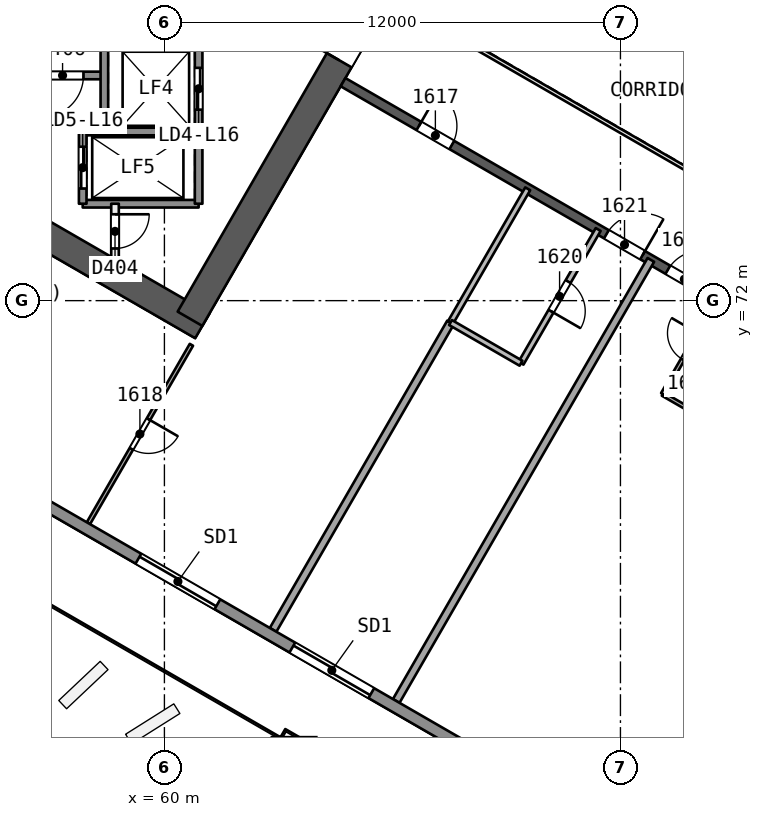
"""IFC4 building model, lengths in metres.
Left out: names, types, materials, properties, quantities, classifications, styles, units other than length and angle.
Written with IfcOpenShell. Run it as: python <this file> out.ifc"""

import sys

from ifc_helpers import new_model, si_unit, direction, frame, frame_2d, origin, origin_2d, place, context, subcontext, project, spatial, rectangle, extrude, element, fill, save


model = new_model("IFC4")
c1 = context("Model", 3, precision=1e-05, world=origin(), true_north=direction((0.0, 1.0)))
c2 = subcontext(c1, "Body", "Model", "MODEL_VIEW")
j1 = project(units=[si_unit("LENGTHUNIT", "METRE"), si_unit("PLANEANGLEUNIT", "RADIAN")], contexts=[c1])
p1 = place(None, origin())
s1 = spatial("IfcSite", under=j1, at=p1, CompositionType="ELEMENT")
p2 = place(p1, origin())
s2 = spatial("IfcBuilding", under=s1, at=p2, CompositionType="ELEMENT")
p3 = place(p2, frame((0.0, 0.0, 72.1)))
s3 = spatial("IfcBuildingStorey", under=s2, at=p3, CompositionType="ELEMENT", Elevation=72.1)
p4 = place(p3, frame((48.772, 78.394, 0.0), z_axis=(0.0, 0.0, 1.0), x_axis=(0.866028339916, -0.499994914436, 0.0)))
e1 = element("IfcWall", 1, at=p4, inside=s3, PredefinedType="SHEAR", context=c2, shape_type="SweptSolid", body=[
    extrude(rectangle(XDim=14.117, YDim=0.75, at=frame_2d((7.059, 0.0))), origin(), (0.0, 0.0, 1.0), 3.7),
])
p5 = place(p3, frame((60.673, 71.523, 0.0), z_axis=(0.0, 0.0, 1.0), x_axis=(0.499997052475, 0.866027105532, 0.0)))
e2 = element("IfcWall", 2, at=p5, inside=s3, PredefinedType="SHEAR", context=c2, shape_type="SweptSolid", body=[
    extrude(rectangle(XDim=10.005, YDim=0.75, at=frame_2d((5.002, 0.0))), origin(), (0.0, 0.0, 1.0), 3.7),
])
p6 = place(p5, frame((7.855, 0.0, 0.0)))
e3 = element("IfcOpeningElement", 3, at=p6, cuts=e2, PredefinedType="OPENING", context=c2, shape_type="SweptSolid", body=[
    extrude(rectangle(XDim=1.2, YDim=2.1, at=frame_2d((0.6, 1.05))), frame((0.0, 0.385, 0.0), z_axis=(0.0, -1.0, 0.0), x_axis=(1.0, 0.0, 0.0)), (0.0, 0.0, 1.0), 0.771),
])
p7 = place(p3, frame((64.7, 77.748, 0.0), z_axis=(0.0, 0.0, 1.0), x_axis=(0.866026492143, -0.499998114903, 0.0)))
e4 = element("IfcWall", 4, at=p7, inside=s3, PredefinedType="SHEAR", context=c2, shape_type="SweptSolid", body=[
    extrude(rectangle(XDim=15.588, YDim=0.25, at=frame_2d((7.794, 0.0))), origin(), (0.0, 0.0, 1.0), 3.2),
])
p8 = place(p7, frame((2.306, 0.0, 0.0)))
e5 = element("IfcOpeningElement", 5, at=p8, cuts=e4, PredefinedType="OPENING", context=c2, shape_type="SweptSolid", body=[
    extrude(rectangle(XDim=1.0, YDim=2.1, at=frame_2d((0.5, 1.05))), frame((0.0, 0.135, 0.0), z_axis=(0.0, -1.0, 0.0), x_axis=(1.0, 0.0, 0.0)), (0.0, 0.0, 1.0), 0.271),
])
p9 = place(p7, frame((8.003, 0.0, 0.0)))
e6 = element("IfcOpeningElement", 6, at=p9, cuts=e4, PredefinedType="OPENING", context=c2, shape_type="SweptSolid", body=[
    extrude(rectangle(XDim=1.1, YDim=2.1, at=frame_2d((0.55, 1.05))), frame((0.0, 0.135, 0.0), z_axis=(0.0, -1.0, 0.0), x_axis=(1.0, 0.0, 0.0)), (0.0, 0.0, 1.0), 0.271),
])
p10 = place(p7, frame((9.871, 0.0, 0.0)))
e7 = element("IfcOpeningElement", 7, at=p10, cuts=e4, PredefinedType="OPENING", context=c2, shape_type="SweptSolid", body=[
    extrude(rectangle(XDim=1.0, YDim=2.1, at=frame_2d((0.5, 1.05))), frame((0.0, 0.135, 0.0), z_axis=(0.0, -1.0, 0.0), x_axis=(1.0, 0.0, 0.0)), (0.0, 0.0, 1.0), 0.271),
])
p11 = place(p3, frame((63.4, 59.908, 0.0), z_axis=(0.010093620709, 0.017482414954, 0.999796221231), x_axis=(-0.866022643586, 0.500004780773, 1.3036e-08)))
e8 = element("IfcColumn", 8, at=p11, inside=s3, PredefinedType="COLUMN", context=c2, shape_type="SweptSolid", body=[
    extrude(rectangle(XDim=1.1, YDim=1.1, at=origin_2d()), origin(), (0.0, 0.0, 1.0), 3.701),
])
p12 = place(p3, frame((60.71, 70.838, 0.0), z_axis=(0.0, 0.0, 1.0), x_axis=(-0.499974500895, -0.866040125199, 0.0)))
e9 = element("IfcWall", 9, at=p12, inside=s3, PredefinedType="PARTITIONING", context=c2, shape_type="SweptSolid", body=[
    extrude(rectangle(XDim=5.422, YDim=0.1, at=frame_2d((2.711, 0.0))), origin(), (0.0, 0.0, 1.0), 3.2),
])
p13 = place(p12, frame((2.261, 0.0, 0.0)))
e10 = element("IfcOpeningElement", 10, at=p13, cuts=e9, PredefinedType="OPENING", context=c2, shape_type="SweptSolid", body=[
    extrude(rectangle(XDim=0.9, YDim=2.1, at=frame_2d((0.45, 1.05))), frame((0.0, 0.061, 0.0), z_axis=(0.0, -1.0, 0.0), x_axis=(1.0, 0.0, 0.0)), (0.0, 0.0, 1.0), 0.121),
])
p14 = place(p3, frame((62.859, 63.337, 0.0), z_axis=(0.0, 0.0, 1.0), x_axis=(0.500016660921, 0.866015784384, 0.0)))
e11 = element("IfcWall", 11, at=p14, inside=s3, PredefinedType="PARTITIONING", context=c2, shape_type="SweptSolid", body=[
    extrude(rectangle(XDim=9.338, YDim=0.2, at=frame_2d((4.669, 0.0))), origin(), (0.0, 0.0, 1.0), 3.2),
])
p15 = place(p3, frame((67.529, 71.424, 0.0), z_axis=(0.0, 0.0, 1.0), x_axis=(0.499984252764, 0.866034495264, 0.0)))
e12 = element("IfcWall", 12, at=p15, inside=s3, PredefinedType="PARTITIONING", context=c2, shape_type="SweptSolid", body=[
    extrude(rectangle(XDim=4.063, YDim=0.15, at=frame_2d((2.032, 0.0))), origin(), (0.0, 0.0, 1.0), 3.2),
])
p16 = place(p3, frame((71.414, 73.872, 0.0), z_axis=(0.0, 0.0, 1.0), x_axis=(-0.499984252764, -0.866034495264, 0.0)))
e13 = element("IfcWall", 13, at=p16, inside=s3, PredefinedType="PARTITIONING", context=c2, shape_type="SweptSolid", body=[
    extrude(rectangle(XDim=4.063, YDim=0.15, at=frame_2d((2.032, 0.0))), origin(), (0.0, 0.0, 1.0), 3.2),
])
p17 = place(p16, frame((1.582, 0.0, 0.0)))
e14 = element("IfcOpeningElement", 14, at=p17, cuts=e13, PredefinedType="OPENING", context=c2, shape_type="SweptSolid", body=[
    extrude(rectangle(XDim=0.9, YDim=2.1, at=frame_2d((0.45, 1.05))), frame((0.0, 0.085, 0.0), z_axis=(0.0, -1.0, 0.0), x_axis=(1.0, 0.0, 0.0)), (0.0, 0.0, 1.0), 0.171),
])
p18 = place(p3, frame((69.383, 70.353, 0.0), z_axis=(0.0, 0.0, 1.0), x_axis=(-0.866024183959, 0.500002112793, 0.0)))
e15 = element("IfcWall", 15, at=p18, inside=s3, PredefinedType="PARTITIONING", context=c2, shape_type="SweptSolid", body=[
    extrude(rectangle(XDim=2.141, YDim=0.15, at=frame_2d((1.071, 0.0))), origin(), (0.0, 0.0, 1.0), 3.2),
])
p19 = place(p3, frame((66.099, 61.466, 0.0), z_axis=(0.0, 0.0, 1.0), x_axis=(0.500006835139, 0.866021457479, 0.0)))
e16 = element("IfcWall", 16, at=p19, inside=s3, PredefinedType="PARTITIONING", context=c2, shape_type="SweptSolid", body=[
    extrude(rectangle(XDim=13.401, YDim=0.2, at=frame_2d((6.701, 0.0))), origin(), (0.0, 0.0, 1.0), 3.2),
])
p20 = place(p3, frame((74.498, 68.743, 0.0), z_axis=(0.0, 0.0, 1.0), x_axis=(-0.865989903783, 0.500061482766, 0.0)))
e17 = element("IfcWall", 17, at=p20, inside=s3, PredefinedType="PARTITIONING", context=c2, shape_type="SweptSolid", body=[
    extrude(rectangle(XDim=1.6, YDim=0.1, at=frame_2d((0.8, 0.0))), origin(), (0.0, 0.0, 1.0), 3.2),
])
p21 = place(p3, frame((73.113, 69.543, 0.0), z_axis=(0.0, 0.0, 1.0), x_axis=(0.499987231761, 0.866032775405, 0.0)))
e18 = element("IfcWall", 18, at=p21, inside=s3, PredefinedType="PARTITIONING", context=c2, shape_type="SweptSolid", body=[
    extrude(rectangle(XDim=2.9, YDim=0.1, at=frame_2d((1.45, 0.0))), origin(), (0.0, 0.0, 1.0), 3.2),
])
p22 = place(p21, frame((1.05, 0.0, 0.0)))
e19 = element("IfcOpeningElement", 19, at=p22, cuts=e18, PredefinedType="OPENING", context=c2, shape_type="SweptSolid", body=[
    extrude(rectangle(XDim=0.8, YDim=2.1, at=frame_2d((0.4, 1.05))), frame((0.0, 0.061, 0.0), z_axis=(0.0, -1.0, 0.0), x_axis=(1.0, 0.0, 0.0)), (0.0, 0.0, 1.0), 0.121),
])
p23 = place(p3, frame((90.388, 47.271, 0.0), z_axis=(0.0, 0.0, 1.0), x_axis=(-0.866024483997, 0.500001593116, 0.0)))
e20 = element("IfcWall", 20, at=p23, inside=s3, PredefinedType="SOLIDWALL", context=c2, shape_type="SweptSolid", body=[
    extrude(rectangle(XDim=59.381, YDim=0.3, at=frame_2d((29.69, 0.0))), origin(), (0.0, 0.0, 1.0), 3.2),
])
p24 = place(p23, frame((28.802, 0.0, 0.0)))
e21 = element("IfcOpeningElement", 21, at=p24, cuts=e20, PredefinedType="OPENING", context=c2, shape_type="SweptSolid", body=[
    extrude(rectangle(XDim=2.4, YDim=2.4, at=frame_2d((1.2, 1.2))), frame((0.0, 0.161, 0.0), z_axis=(0.0, -1.0, 0.0), x_axis=(1.0, 0.0, 0.0)), (0.0, 0.0, 1.0), 0.321),
])
p25 = place(p23, frame((33.479, 0.0, 0.0)))
e22 = element("IfcOpeningElement", 22, at=p25, cuts=e20, PredefinedType="OPENING", context=c2, shape_type="SweptSolid", body=[
    extrude(rectangle(XDim=2.4, YDim=2.4, at=frame_2d((1.2, 1.2))), frame((0.0, 0.161, 0.0), z_axis=(0.0, -1.0, 0.0), x_axis=(1.0, 0.0, 0.0)), (0.0, 0.0, 1.0), 0.321),
])
p26 = place(p23, frame((46.066, 0.0, 0.0)))
e23 = element("IfcOpeningElement", 23, at=p26, cuts=e20, PredefinedType="OPENING", context=c2, shape_type="SweptSolid", body=[
    extrude(rectangle(XDim=2.4, YDim=2.4, at=frame_2d((1.2, 1.2))), frame((0.0, 0.161, 0.0), z_axis=(0.0, -1.0, 0.0), x_axis=(1.0, 0.0, 0.0)), (0.0, 0.0, 1.0), 0.321),
])
p27 = place(p23, frame((12.823, 0.0, 0.0)))
e24 = element("IfcOpeningElement", 24, at=p27, cuts=e20, PredefinedType="OPENING", context=c2, shape_type="SweptSolid", body=[
    extrude(rectangle(XDim=2.4, YDim=2.4, at=frame_2d((1.2, 1.2))), frame((0.0, 0.161, 0.0), z_axis=(0.0, -1.0, 0.0), x_axis=(1.0, 0.0, 0.0)), (0.0, 0.0, 1.0), 0.321),
])
p28 = place(p3, frame((58.42, 77.925, 0.0), z_axis=(0.0, 0.0, 1.0), x_axis=(-1.0, 0.0, 0.0)))
e25 = element("IfcWall", 25, at=p28, inside=s3, PredefinedType="SOLIDWALL", context=c2, shape_type="SweptSolid", body=[
    extrude(rectangle(XDim=7.7, YDim=0.2, at=frame_2d((3.85, 0.0))), origin(), (0.0, 0.0, 1.0), 3.2),
])
p29 = place(p28, frame((0.55, 0.0, 0.0)))
e26 = element("IfcOpeningElement", 26, at=p29, cuts=e25, PredefinedType="OPENING", context=c2, shape_type="SweptSolid", body=[
    extrude(rectangle(XDim=1.1, YDim=2.1, at=frame_2d((0.55, 1.05))), frame((0.0, 0.11, 0.0), z_axis=(0.0, -1.0, 0.0), x_axis=(1.0, 0.0, 0.0)), (0.0, 0.0, 1.0), 0.221),
])
for number, where, z_axis, x_axis in (
    (27, (60.9, 76.45, 0.0), (0.0, 0.0, 1.0), (-1.0, 0.0, 0.0)),
    (28, (60.9, 74.55, 0.0), (0.0, 0.0, 1.0), (-1.0, 0.0, 0.0)),
):
    element("IfcWall", number, at=place(p3, frame(where, z_axis=z_axis, x_axis=x_axis)), inside=s3, PredefinedType="SOLIDWALL", context=c2, shape_type="SweptSolid", body=[
        extrude(rectangle(XDim=3.05, YDim=0.2, at=frame_2d((1.525, 0.0))), origin(), (0.0, 0.0, 1.0), 3.2),
    ])
p30 = place(p3, frame((60.9, 85.45, 0.0), z_axis=(0.0, 0.0, 1.0), x_axis=(0.0, -1.0, 0.0)))
e29 = element("IfcWall", 29, at=p30, inside=s3, PredefinedType="SOLIDWALL", context=c2, shape_type="SweptSolid", body=[
    extrude(rectangle(XDim=10.9, YDim=0.2, at=frame_2d((5.45, 0.0))), origin(), (0.0, 0.0, 1.0), 3.2),
])
p31 = place(p30, frame((0.575, 0.0, 0.0)))
e30 = element("IfcOpeningElement", 30, at=p31, cuts=e29, PredefinedType="OPENING", context=c2, shape_type="SweptSolid", body=[
    extrude(rectangle(XDim=1.1, YDim=2.1, at=frame_2d((0.55, 1.05))), frame((0.0, 0.11, 0.0), z_axis=(0.0, -1.0, 0.0), x_axis=(1.0, 0.0, 0.0)), (0.0, 0.0, 1.0), 0.221),
])
p32 = place(p30, frame((2.825, 0.0, 0.0)))
e31 = element("IfcOpeningElement", 31, at=p32, cuts=e29, PredefinedType="OPENING", context=c2, shape_type="SweptSolid", body=[
    extrude(rectangle(XDim=1.1, YDim=2.1, at=frame_2d((0.55, 1.05))), frame((0.0, 0.11, 0.0), z_axis=(0.0, -1.0, 0.0), x_axis=(1.0, 0.0, 0.0)), (0.0, 0.0, 1.0), 0.221),
])
p33 = place(p30, frame((5.075, 0.0, 0.0)))
e32 = element("IfcOpeningElement", 32, at=p33, cuts=e29, PredefinedType="OPENING", context=c2, shape_type="SweptSolid", body=[
    extrude(rectangle(XDim=1.1, YDim=2.1, at=frame_2d((0.55, 1.05))), frame((0.0, 0.11, 0.0), z_axis=(0.0, -1.0, 0.0), x_axis=(1.0, 0.0, 0.0)), (0.0, 0.0, 1.0), 0.221),
])
p34 = place(p30, frame((7.325, 0.0, 0.0)))
e33 = element("IfcOpeningElement", 33, at=p34, cuts=e29, PredefinedType="OPENING", context=c2, shape_type="SweptSolid", body=[
    extrude(rectangle(XDim=1.1, YDim=2.1, at=frame_2d((0.55, 1.05))), frame((0.0, 0.11, 0.0), z_axis=(0.0, -1.0, 0.0), x_axis=(1.0, 0.0, 0.0)), (0.0, 0.0, 1.0), 0.221),
])
p35 = place(p3, frame((58.7, 74.55, 0.0), z_axis=(0.0, 0.0, 1.0), x_axis=(0.0, -1.0, 0.0)))
e34 = element("IfcWall", 34, at=p35, inside=s3, PredefinedType="PARTITIONING", context=c2, shape_type="SweptSolid", body=[
    extrude(rectangle(XDim=1.455, YDim=0.2, at=frame_2d((0.728, 0.0))), origin(), (0.0, 0.0, 1.0), 3.2),
])
p36 = place(p35, frame((0.278, 0.0, 0.0)))
e35 = element("IfcOpeningElement", 35, at=p36, cuts=e34, PredefinedType="OPENING", context=c2, shape_type="SweptSolid", body=[
    extrude(rectangle(XDim=0.9, YDim=2.1, at=frame_2d((0.45, 1.05))), frame((0.0, 0.11, 0.0), z_axis=(0.0, -1.0, 0.0), x_axis=(1.0, 0.0, 0.0)), (0.0, 0.0, 1.0), 0.221),
])
p37 = place(p3, frame((58.42, 85.45, 0.0), z_axis=(0.0, 0.0, 1.0), x_axis=(0.0, -1.0, 0.0)))
e36 = element("IfcWall", 36, at=p37, inside=s3, PredefinedType="SOLIDWALL", context=c2, shape_type="SweptSolid", body=[
    extrude(rectangle(XDim=9.0, YDim=0.2, at=frame_2d((4.5, 0.0))), origin(), (0.0, 0.0, 1.0), 3.2),
])
p38 = place(p3, frame((57.85, 76.45, 0.0), z_axis=(0.0, 0.0, 1.0), x_axis=(0.0, -1.0, 0.0)))
e37 = element("IfcWall", 37, at=p38, inside=s3, PredefinedType="SOLIDWALL", context=c2, shape_type="SweptSolid", body=[
    extrude(rectangle(XDim=1.9, YDim=0.2, at=frame_2d((0.95, 0.0))), origin(), (0.0, 0.0, 1.0), 3.2),
])
p39 = place(p38, frame((0.4, 0.0, 0.0)))
e38 = element("IfcOpeningElement", 38, at=p39, cuts=e37, PredefinedType="OPENING", context=c2, shape_type="SweptSolid", body=[
    extrude(rectangle(XDim=1.1, YDim=2.1, at=frame_2d((0.55, 1.05))), frame((0.0, 0.11, 0.0), z_axis=(0.0, -1.0, 0.0), x_axis=(1.0, 0.0, 0.0)), (0.0, 0.0, 1.0), 0.221),
])
p40 = place(p3, frame((67.702, 78.948, 0.0), z_axis=(0.0, 0.0, 1.0), x_axis=(0.866026658274, -0.499997827154, 0.0)))
e39 = element("IfcWall", 39, at=p40, inside=s3, PredefinedType="PARTITIONING", context=c2, shape_type="SweptSolid", body=[
    extrude(rectangle(XDim=11.588, YDim=0.1, at=frame_2d((5.794, 0.0))), origin(), (0.0, 0.0, 1.0), 3.2),
])
p41 = place(p8, origin())
e40 = element("IfcDoor", 40, at=p41, inside=s3, OperationType="SINGLE_SWING_LEFT", PredefinedType="NOTDEFINED", context=c2, shape_type="SweptSolid", body=[
    extrude(rectangle(XDim=1.0, YDim=2.1, at=frame_2d((0.5, 1.05))), frame((0.0, 0.025, 0.0), z_axis=(0.0, -1.0, 0.0), x_axis=(1.0, 0.0, 0.0)), (0.0, 0.0, 1.0), 0.05),
])
fill(e5, e40)
p42 = place(p13, origin())
e41 = element("IfcDoor", 41, at=p42, inside=s3, OperationType="SINGLE_SWING_LEFT", PredefinedType="NOTDEFINED", context=c2, shape_type="SweptSolid", body=[
    extrude(rectangle(XDim=0.9, YDim=2.1, at=frame_2d((0.45, 1.05))), frame((0.0, 0.025, 0.0), z_axis=(0.0, -1.0, 0.0), x_axis=(1.0, 0.0, 0.0)), (0.0, 0.0, 1.0), 0.05),
])
fill(e10, e41)
p43 = place(p17, origin())
e42 = element("IfcDoor", 42, at=p43, inside=s3, OperationType="SINGLE_SWING_RIGHT", PredefinedType="NOTDEFINED", context=c2, shape_type="SweptSolid", body=[
    extrude(rectangle(XDim=0.9, YDim=2.1, at=frame_2d((0.45, 1.05))), frame((0.0, 0.025, 0.0), z_axis=(0.0, -1.0, 0.0), x_axis=(1.0, 0.0, 0.0)), (0.0, 0.0, 1.0), 0.05),
])
fill(e14, e42)
p44 = place(p9, origin())
e43 = element("IfcDoor", 43, at=p44, inside=s3, OperationType="SINGLE_SWING_RIGHT", PredefinedType="NOTDEFINED", context=c2, shape_type="SweptSolid", body=[
    extrude(rectangle(XDim=1.1, YDim=2.1, at=frame_2d((0.55, 1.05))), frame((0.0, 0.025, 0.0), z_axis=(0.0, -1.0, 0.0), x_axis=(1.0, 0.0, 0.0)), (0.0, 0.0, 1.0), 0.05),
])
fill(e6, e43)
p45 = place(p22, origin())
e44 = element("IfcDoor", 44, at=p45, inside=s3, OperationType="SINGLE_SWING_RIGHT", PredefinedType="NOTDEFINED", context=c2, shape_type="SweptSolid", body=[
    extrude(rectangle(XDim=0.8, YDim=2.1, at=frame_2d((0.4, 1.05))), frame((0.0, 0.025, 0.0), z_axis=(0.0, -1.0, 0.0), x_axis=(1.0, 0.0, 0.0)), (0.0, 0.0, 1.0), 0.05),
])
fill(e19, e44)
p46 = place(p10, origin())
e45 = element("IfcDoor", 45, at=p46, inside=s3, OperationType="SINGLE_SWING_RIGHT", PredefinedType="NOTDEFINED", context=c2, shape_type="SweptSolid", body=[
    extrude(rectangle(XDim=1.0, YDim=2.1, at=frame_2d((0.5, 1.05))), frame((0.0, 0.025, 0.0), z_axis=(0.0, -1.0, 0.0), x_axis=(1.0, 0.0, 0.0)), (0.0, 0.0, 1.0), 0.05),
])
fill(e7, e45)
p47 = place(p24, origin())
e46 = element("IfcDoor", 46, at=p47, inside=s3, OperationType="SLIDING_TO_LEFT", PredefinedType="NOTDEFINED", context=c2, shape_type="SweptSolid", body=[
    extrude(rectangle(XDim=2.4, YDim=2.4, at=frame_2d((1.2, 1.2))), frame((0.0, 0.025, 0.0), z_axis=(0.0, -1.0, 0.0), x_axis=(1.0, 0.0, 0.0)), (0.0, 0.0, 1.0), 0.05),
])
fill(e21, e46)
p48 = place(p25, origin())
e47 = element("IfcDoor", 47, at=p48, inside=s3, OperationType="SLIDING_TO_RIGHT", PredefinedType="NOTDEFINED", context=c2, shape_type="SweptSolid", body=[
    extrude(rectangle(XDim=2.4, YDim=2.4, at=frame_2d((1.2, 1.2))), frame((0.0, 0.025, 0.0), z_axis=(0.0, -1.0, 0.0), x_axis=(1.0, 0.0, 0.0)), (0.0, 0.0, 1.0), 0.05),
])
fill(e22, e47)
p49 = place(p6, origin())
e48 = element("IfcDoor", 48, at=p49, inside=s3, OperationType="SINGLE_SWING_LEFT", PredefinedType="NOTDEFINED", context=c2, shape_type="SweptSolid", body=[
    extrude(rectangle(XDim=1.2, YDim=2.1, at=frame_2d((0.6, 1.05))), frame((0.0, 0.025, 0.0), z_axis=(0.0, -1.0, 0.0), x_axis=(1.0, 0.0, 0.0)), (0.0, 0.0, 1.0), 0.05),
])
fill(e3, e48)
p50 = place(p34, origin())
e49 = element("IfcDoor", 49, at=p50, inside=s3, OperationType="SLIDING_TO_LEFT", PredefinedType="NOTDEFINED", context=c2, shape_type="SweptSolid", body=[
    extrude(rectangle(XDim=1.1, YDim=2.1, at=frame_2d((0.55, 1.05))), frame((0.0, 0.025, 0.0), z_axis=(0.0, -1.0, 0.0), x_axis=(1.0, 0.0, 0.0)), (0.0, 0.0, 1.0), 0.05),
])
fill(e33, e49)
p51 = place(p39, origin())
e50 = element("IfcDoor", 50, at=p51, inside=s3, OperationType="SLIDING_TO_RIGHT", PredefinedType="NOTDEFINED", context=c2, shape_type="SweptSolid", body=[
    extrude(rectangle(XDim=1.1, YDim=2.1, at=frame_2d((0.55, 1.05))), frame((0.0, 0.025, 0.0), z_axis=(0.0, -1.0, 0.0), x_axis=(1.0, 0.0, 0.0)), (0.0, 0.0, 1.0), 0.05),
])
fill(e38, e50)
p52 = place(p36, origin())
e51 = element("IfcDoor", 51, at=p52, inside=s3, OperationType="SINGLE_SWING_LEFT", PredefinedType="NOTDEFINED", context=c2, shape_type="SweptSolid", body=[
    extrude(rectangle(XDim=0.9, YDim=2.1, at=frame_2d((0.45, 1.05))), frame((0.0, 0.025, 0.0), z_axis=(0.0, -1.0, 0.0), x_axis=(1.0, 0.0, 0.0)), (0.0, 0.0, 1.0), 0.05),
])
fill(e35, e51)
p53 = place(p29, origin())
e52 = element("IfcDoor", 52, at=p53, inside=s3, OperationType="SINGLE_SWING_RIGHT", PredefinedType="NOTDEFINED", context=c2, shape_type="SweptSolid", body=[
    extrude(rectangle(XDim=1.1, YDim=2.1, at=frame_2d((0.55, 1.05))), frame((0.0, 0.025, 0.0), z_axis=(0.0, -1.0, 0.0), x_axis=(1.0, 0.0, 0.0)), (0.0, 0.0, 1.0), 0.05),
])
fill(e26, e52)
save(model, sys.argv[1])
